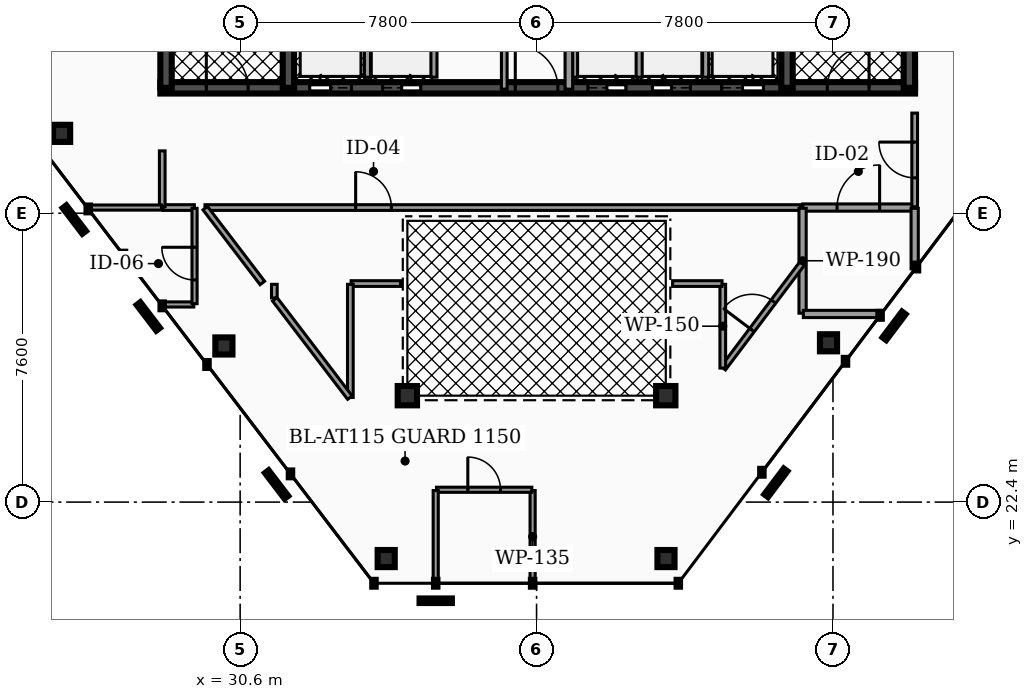
"""IFC4 building model, lengths in metres.
Left out: names, types, materials, properties, quantities, classifications, styles, units other than length and angle.
Written with IfcOpenShell. Run it as: python <this file> out.ifc"""

import sys

from ifc_helpers import new_model, si_unit, direction, frame, frame_2d, origin, origin_2d, place, context, subcontext, project, spatial, rectangle, hollow_rectangle, hollow_circle, extrude, element, fill, save


model = new_model("IFC4")
c1 = context("Model", 3, precision=1e-05, world=origin(), true_north=direction((0.0, 1.0)))
c2 = subcontext(c1, "Body", "Model", "MODEL_VIEW")
j1 = project(units=[si_unit("LENGTHUNIT", "METRE"), si_unit("PLANEANGLEUNIT", "RADIAN")], contexts=[c1])
p1 = place(None, origin())
s1 = spatial("IfcSite", under=j1, at=p1, CompositionType="ELEMENT")
p2 = place(p1, origin())
s2 = spatial("IfcBuilding", under=s1, at=p2, CompositionType="ELEMENT")
p3 = place(p2, frame((0.0, 0.0, 292.4)))
s3 = spatial("IfcBuildingStorey", under=s2, at=p3, CompositionType="ELEMENT", Elevation=292.4)
p4 = place(p3, frame((28.5, 33.3, 0.0), z_axis=(0.0, 0.0, 1.0), x_axis=(1.0, 0.0, 0.0)))
e1 = element("IfcWall", 1, at=p4, inside=s3, PredefinedType="SHEAR", context=c2, shape_type="SweptSolid", body=[
    extrude(rectangle(XDim=19.86, YDim=0.3, at=frame_2d((9.93, 0.0))), origin(), (0.0, 0.0, 1.0), 3.18),
])
p5 = place(p4, frame((3.93, 0.0, 0.0)))
e2 = element("IfcOpeningElement", 2, at=p5, cuts=e1, PredefinedType="OPENING", context=c2, shape_type="SweptSolid", body=[
    extrude(rectangle(XDim=1.1, YDim=2.15, at=frame_2d((0.55, 1.075))), frame((0.0, 0.16, 0.0), z_axis=(0.0, -1.0, 0.0), x_axis=(1.0, 0.0, 0.0)), (0.0, 0.0, 1.0), 0.32),
])
p6 = place(p4, frame((14.77, 0.0, 0.0)))
e3 = element("IfcOpeningElement", 3, at=p6, cuts=e1, PredefinedType="OPENING", context=c2, shape_type="SweptSolid", body=[
    extrude(rectangle(XDim=1.1, YDim=2.15, at=frame_2d((0.55, 1.075))), frame((0.0, 0.16, 0.0), z_axis=(0.0, -1.0, 0.0), x_axis=(1.0, 0.0, 0.0)), (0.0, 0.0, 1.0), 0.32),
])
p7 = place(p4, frame((11.25, 0.0, 0.0)))
e4 = element("IfcOpeningElement", 4, at=p7, cuts=e1, PredefinedType="OPENING", context=c2, shape_type="SweptSolid", body=[
    extrude(rectangle(XDim=1.0, YDim=2.1, at=frame_2d((0.5, 1.05))), frame((0.0, 0.16, 0.0), z_axis=(0.0, -1.0, 0.0), x_axis=(1.0, 0.0, 0.0)), (0.0, 0.0, 1.0), 0.32),
])
p8 = place(p4, frame((12.95, 0.0, 0.0)))
e5 = element("IfcOpeningElement", 5, at=p8, cuts=e1, PredefinedType="OPENING", context=c2, shape_type="SweptSolid", body=[
    extrude(rectangle(XDim=1.0, YDim=2.1, at=frame_2d((0.5, 1.05))), frame((0.0, 0.16, 0.0), z_axis=(0.0, -1.0, 0.0), x_axis=(1.0, 0.0, 0.0)), (0.0, 0.0, 1.0), 0.32),
])
p9 = place(p4, frame((5.85, 0.0, 0.0)))
e6 = element("IfcOpeningElement", 6, at=p9, cuts=e1, PredefinedType="OPENING", context=c2, shape_type="SweptSolid", body=[
    extrude(rectangle(XDim=1.0, YDim=2.1, at=frame_2d((0.5, 1.05))), frame((0.0, 0.16, 0.0), z_axis=(0.0, -1.0, 0.0), x_axis=(1.0, 0.0, 0.0)), (0.0, 0.0, 1.0), 0.32),
])
p10 = place(p4, frame((1.21, 0.0, 0.0)))
e7 = element("IfcOpeningElement", 7, at=p10, cuts=e1, PredefinedType="OPENING", context=c2, shape_type="SweptSolid", body=[
    extrude(rectangle(XDim=1.1, YDim=2.2, at=frame_2d((0.55, 1.1))), frame((0.0, 0.16, 0.0), z_axis=(0.0, -1.0, 0.0), x_axis=(1.0, 0.0, 0.0)), (0.0, 0.0, 1.0), 0.32),
])
p11 = place(p4, frame((9.34, 0.0, 0.0)))
e8 = element("IfcOpeningElement", 8, at=p11, cuts=e1, PredefinedType="OPENING", context=c2, shape_type="SweptSolid", body=[
    extrude(rectangle(XDim=1.12, YDim=2.05, at=frame_2d((0.56, 1.025))), frame((0.0, 0.16, 0.0), z_axis=(0.0, -1.0, 0.0), x_axis=(1.0, 0.0, 0.0)), (0.0, 0.0, 1.0), 0.32),
])
p12 = place(p4, frame((17.55, 0.0, 0.0)))
e9 = element("IfcOpeningElement", 9, at=p12, cuts=e1, PredefinedType="OPENING", context=c2, shape_type="SweptSolid", body=[
    extrude(rectangle(XDim=1.1, YDim=2.2, at=frame_2d((0.55, 1.1))), frame((0.0, 0.16, 0.0), z_axis=(0.0, -1.0, 0.0), x_axis=(1.0, 0.0, 0.0)), (0.0, 0.0, 1.0), 0.32),
])
for number, where, z_axis, x_axis in (
    (10, (28.65, 33.3, 0.0), (0.0, 0.0, 1.0), (0.0, 1.0, 0.0)),
    (11, (31.87, 33.3, 0.0), (0.0, 0.0, 1.0), (0.0, 1.0, 0.0)),
    (12, (44.99, 33.3, 0.0), (0.0, 0.0, 1.0), (0.0, 1.0, 0.0)),
    (13, (48.21, 33.3, 0.0), (0.0, 0.0, 1.0), (0.0, 1.0, 0.0)),
):
    element("IfcWall", number, at=place(p3, frame(where, z_axis=z_axis, x_axis=x_axis)), inside=s3, PredefinedType="SHEAR", context=c2, shape_type="SweptSolid", body=[
        extrude(rectangle(XDim=10.1, YDim=0.3, at=frame_2d((5.05, 0.0))), origin(), (0.0, 0.0, 1.0), 3.18),
    ])
for number, where, z_axis, x_axis in (
    (14, (25.902, 32.102, 0.0), (0.0, 0.0, 1.0), (1.0, 0.0, 0.0)),
    (15, (30.173, 26.508, 0.0), (0.0, 0.0, 1.0), (1.0, 0.0, 0.0)),
    (16, (34.443, 20.914, 0.0), (0.0, 0.0, 1.0), (1.0, 0.0, 0.0)),
    (17, (41.806, 20.914, 0.0), (0.0, 0.0, 1.0), (1.0, 0.0, 0.0)),
    (18, (46.082, 26.592, 0.0), (0.0, 0.0, 1.0), (1.0, 0.0, 0.0)),
):
    element("IfcColumn", number, at=place(p3, frame(where, z_axis=z_axis, x_axis=x_axis)), inside=s3, PredefinedType="COLUMN", context=c2, shape_type="SweptSolid", body=[
        extrude(hollow_rectangle(XDim=0.45, YDim=0.45, WallThickness=0.022, at=origin_2d()), origin(), (0.0, 0.0, 1.0), 3.18),
    ])
for number, where, z_axis, x_axis in (
    (19, (35.0, 25.2, 0.0), (0.0, 0.0, 1.0), (1.0, 0.0, 0.0)),
    (20, (41.8, 25.2, 0.0), (0.0, 0.0, 1.0), (1.0, 0.0, 0.0)),
):
    element("IfcColumn", number, at=place(p3, frame(where, z_axis=z_axis, x_axis=x_axis)), inside=s3, PredefinedType="COLUMN", context=c2, shape_type="SweptSolid", body=[
        extrude(hollow_circle(Radius=0.254, WallThickness=0.02, at=origin_2d()), origin(), (0.0, 0.0, 1.0), 3.18),
    ])
for number, where, z_axis, x_axis in (
    (21, (33.95, 33.58, 0.0), (0.0, 0.0, 1.0), (0.0, 1.0, 0.0)),
    (22, (42.85, 33.58, 0.0), (0.0, 0.0, 1.0), (0.0, 1.0, 0.0)),
):
    element("IfcWall", number, at=place(p3, frame(where, z_axis=z_axis, x_axis=x_axis)), inside=s3, PredefinedType="SOLIDWALL", context=c2, shape_type="SweptSolid", body=[
        extrude(rectangle(XDim=2.45, YDim=0.16, at=frame_2d((1.225, 0.0))), origin(), (0.0, 0.0, 1.0), 3.18),
    ])
for number, where, z_axis, x_axis in (
    (23, (39.4, 33.58, 0.0), (0.0, 0.0, 1.0), (0.0, 1.0, 0.0)),
    (24, (41.1, 33.58, 0.0), (0.0, 0.0, 1.0), (0.0, 1.0, 0.0)),
    (25, (35.7, 33.58, 0.0), (0.0, 0.0, 1.0), (0.0, 1.0, 0.0)),
):
    element("IfcWall", number, at=place(p3, frame(where, z_axis=z_axis, x_axis=x_axis)), inside=s3, PredefinedType="SOLIDWALL", context=c2, shape_type="SweptSolid", body=[
        extrude(rectangle(XDim=2.25, YDim=0.16, at=frame_2d((1.125, 0.0))), origin(), (0.0, 0.0, 1.0), 3.18),
    ])
p13 = place(p3, frame((37.55, 33.265, 0.0), z_axis=(0.0, 0.0, 1.0), x_axis=(0.0, 1.0, 0.0)))
e26 = element("IfcWall", 26, at=p13, inside=s3, PredefinedType="PARTITIONING", context=c2, shape_type="SweptSolid", body=[
    extrude(rectangle(XDim=3.615, YDim=0.15, at=frame_2d((1.808, 0.0))), origin(), (0.0, 0.0, 1.0), 2.235),
])
p14 = place(p13, frame((1.337, 0.0, 0.0)))
e27 = element("IfcOpeningElement", 27, at=p14, cuts=e26, PredefinedType="OPENING", context=c2, shape_type="SweptSolid", body=[
    extrude(rectangle(XDim=0.94, YDim=2.05, at=frame_2d((0.47, 1.025))), frame((0.0, 0.085, 0.0), z_axis=(0.0, -1.0, 0.0), x_axis=(1.0, 0.0, 0.0)), (0.0, 0.0, 1.0), 0.17),
])
p15 = place(p3, frame((39.25, 33.265, 0.0), z_axis=(0.0, 0.0, 1.0), x_axis=(0.0, 1.0, 0.0)))
e28 = element("IfcWall", 28, at=p15, inside=s3, PredefinedType="PARTITIONING", context=c2, shape_type="SweptSolid", body=[
    extrude(rectangle(XDim=3.615, YDim=0.2, at=frame_2d((1.808, 0.0))), origin(), (0.0, 0.0, 1.0), 2.235),
])
p16 = place(p3, frame((45.405, 30.15, 0.0), z_axis=(0.0, 0.0, 1.0), x_axis=(1.0, 0.0, 0.0)))
e29 = element("IfcWall", 29, at=p16, inside=s3, PredefinedType="PARTITIONING", context=c2, shape_type="SweptSolid", body=[
    extrude(rectangle(XDim=2.925, YDim=0.19, at=frame_2d((1.462, 0.0))), origin(), (0.0, 0.0, 1.0), 2.235),
])
p17 = place(p16, frame((0.903, 0.0, 0.0)))
e30 = element("IfcOpeningElement", 30, at=p17, cuts=e29, PredefinedType="OPENING", context=c2, shape_type="SweptSolid", body=[
    extrude(rectangle(XDim=1.12, YDim=2.05, at=frame_2d((0.56, 1.025))), frame((0.0, 0.105, 0.0), z_axis=(0.0, -1.0, 0.0), x_axis=(1.0, 0.0, 0.0)), (0.0, 0.0, 1.0), 0.21),
])
p18 = place(p3, frame((29.675, 30.15, 0.0), z_axis=(0.0, 0.0, 1.0), x_axis=(1.0, 0.0, 0.0)))
e31 = element("IfcWall", 31, at=p18, inside=s3, PredefinedType="PARTITIONING", context=c2, shape_type="SweptSolid", body=[
    extrude(rectangle(XDim=15.67, YDim=0.15, at=frame_2d((7.835, 0.0))), origin(), (0.0, 0.0, 1.0), 2.235),
])
p19 = place(p18, frame((3.965, 0.0, 0.0)))
e32 = element("IfcOpeningElement", 32, at=p19, cuts=e31, PredefinedType="OPENING", context=c2, shape_type="SweptSolid", body=[
    extrude(rectangle(XDim=0.94, YDim=2.05, at=frame_2d((0.47, 1.025))), frame((0.0, 0.085, 0.0), z_axis=(0.0, -1.0, 0.0), x_axis=(1.0, 0.0, 0.0)), (0.0, 0.0, 1.0), 0.17),
])
p20 = place(p3, frame((28.57, 30.15, 0.0), z_axis=(0.0, 0.0, 1.0), x_axis=(1.0, 0.0, 0.0)))
e33 = element("IfcWall", 33, at=p20, inside=s3, PredefinedType="PARTITIONING", context=c2, shape_type="SweptSolid", body=[
    extrude(rectangle(XDim=0.825, YDim=0.15, at=frame_2d((0.413, 0.0))), origin(), (0.0, 0.0, 1.0), 2.235),
])
p21 = place(p3, frame((28.55, 30.17, 0.0), z_axis=(0.0, 0.0, 1.0), x_axis=(0.0, 1.0, 0.0)))
e34 = element("IfcWall", 34, at=p21, inside=s3, PredefinedType="PARTITIONING", context=c2, shape_type="SweptSolid", body=[
    extrude(rectangle(XDim=1.471, YDim=0.15, at=frame_2d((0.736, 0.0))), origin(), (0.0, 0.0, 1.0), 2.235),
])
p22 = place(p3, frame((48.35, 30.17, 0.0), z_axis=(0.0, 0.0, 1.0), x_axis=(0.0, 1.0, 0.0)))
e35 = element("IfcWall", 35, at=p22, inside=s3, PredefinedType="PARTITIONING", context=c2, shape_type="SweptSolid", body=[
    extrude(rectangle(XDim=2.465, YDim=0.15, at=frame_2d((1.233, 0.0))), origin(), (0.0, 0.0, 1.0), 2.235),
])
p23 = place(p22, frame((0.763, 0.0, 0.0)))
e36 = element("IfcOpeningElement", 36, at=p23, cuts=e35, PredefinedType="OPENING", context=c2, shape_type="SweptSolid", body=[
    extrude(rectangle(XDim=0.94, YDim=2.05, at=frame_2d((0.47, 1.025))), frame((0.0, 0.085, 0.0), z_axis=(0.0, -1.0, 0.0), x_axis=(1.0, 0.0, 0.0)), (0.0, 0.0, 1.0), 0.17),
])
p24 = place(p3, frame((45.4, 27.37, 0.0), z_axis=(0.0, 0.0, 1.0), x_axis=(0.0, 1.0, 0.0)))
e37 = element("IfcWall", 37, at=p24, inside=s3, PredefinedType="PARTITIONING", context=c2, shape_type="SweptSolid", body=[
    extrude(rectangle(XDim=2.76, YDim=0.19, at=frame_2d((1.38, 0.0))), origin(), (0.0, 0.0, 1.0), 2.235),
])
p25 = place(p3, frame((45.42, 27.35, 0.0), z_axis=(0.0, 0.0, 1.0), x_axis=(1.0, 0.0, 0.0)))
e38 = element("IfcWall", 38, at=p25, inside=s3, PredefinedType="PARTITIONING", context=c2, shape_type="SweptSolid", body=[
    extrude(rectangle(XDim=2.032, YDim=0.19, at=frame_2d((1.016, 0.0))), origin(), (0.0, 0.0, 1.0), 2.235),
])
p26 = place(p3, frame((48.35, 28.537, 0.0), z_axis=(0.0, 0.0, 1.0), x_axis=(0.0, 1.0, 0.0)))
e39 = element("IfcWall", 39, at=p26, inside=s3, PredefinedType="PARTITIONING", context=c2, shape_type="SweptSolid", body=[
    extrude(rectangle(XDim=1.593, YDim=0.19, at=frame_2d((0.797, 0.0))), origin(), (0.0, 0.0, 1.0), 2.235),
])
p27 = place(p3, frame((43.312, 25.922, 0.0), z_axis=(0.0, 0.0, 1.0), x_axis=(0.60171699977, 0.798709366533, 0.0)))
e40 = element("IfcWall", 40, at=p27, inside=s3, PredefinedType="PARTITIONING", context=c2, shape_type="SweptSolid", body=[
    extrude(rectangle(XDim=3.455, YDim=0.15, at=frame_2d((1.728, 0.0))), origin(), (0.0, 0.0, 1.0), 2.235),
])
p28 = place(p27, frame((1.258, 0.0, 0.0)))
e41 = element("IfcOpeningElement", 41, at=p28, cuts=e40, PredefinedType="OPENING", context=c2, shape_type="SweptSolid", body=[
    extrude(rectangle(XDim=0.94, YDim=2.05, at=frame_2d((0.47, 1.025))), frame((0.0, 0.085, 0.0), z_axis=(0.0, -1.0, 0.0), x_axis=(1.0, 0.0, 0.0)), (0.0, 0.0, 1.0), 0.17),
])
p29 = place(p3, frame((43.3, 25.926, 0.0), z_axis=(0.0, 0.0, 1.0), x_axis=(0.0, 1.0, 0.0)))
e42 = element("IfcWall", 42, at=p29, inside=s3, PredefinedType="PARTITIONING", context=c2, shape_type="SweptSolid", body=[
    extrude(rectangle(XDim=2.204, YDim=0.15, at=frame_2d((1.102, 0.0))), origin(), (0.0, 0.0, 1.0), 2.235),
])
for number, where, z_axis, x_axis in (
    (43, (41.98, 28.15, 0.0), (0.0, 0.0, 1.0), (1.0, 0.0, 0.0)),
    (44, (33.52, 28.15, 0.0), (0.0, 0.0, 1.0), (1.0, 0.0, 0.0)),
):
    element("IfcWall", number, at=place(p3, frame(where, z_axis=z_axis, x_axis=x_axis)), inside=s3, PredefinedType="PARTITIONING", context=c2, shape_type="SweptSolid", body=[
        extrude(rectangle(XDim=1.3, YDim=0.15, at=frame_2d((0.65, 0.0))), origin(), (0.0, 0.0, 1.0), 2.235),
    ])
p30 = place(p3, frame((33.5, 25.153, 0.0), z_axis=(0.0, 0.0, 1.0), x_axis=(0.0, 1.0, 0.0)))
e45 = element("IfcWall", 45, at=p30, inside=s3, PredefinedType="PARTITIONING", context=c2, shape_type="SweptSolid", body=[
    extrude(rectangle(XDim=2.977, YDim=0.15, at=frame_2d((1.489, 0.0))), origin(), (0.0, 0.0, 1.0), 2.235),
])
p31 = place(p3, frame((31.512, 27.736, 0.0), z_axis=(0.0, 0.0, 1.0), x_axis=(0.606793028784, -0.794859874581, 0.0)))
e46 = element("IfcWall", 46, at=p31, inside=s3, PredefinedType="PARTITIONING", context=c2, shape_type="SweptSolid", body=[
    extrude(rectangle(XDim=3.256, YDim=0.15, at=frame_2d((1.628, 0.0))), origin(), (0.0, 0.0, 1.0), 2.235),
])
p32 = place(p3, frame((31.5, 27.772, 0.0), z_axis=(0.0, 0.0, 1.0), x_axis=(0.0, 1.0, 0.0)))
e47 = element("IfcWall", 47, at=p32, inside=s3, PredefinedType="PARTITIONING", context=c2, shape_type="SweptSolid", body=[
    extrude(rectangle(XDim=0.358, YDim=0.15, at=frame_2d((0.179, 0.0))), origin(), (0.0, 0.0, 1.0), 2.235),
])
p33 = place(p3, frame((29.682, 30.134, 0.0), z_axis=(0.0, 0.0, 1.0), x_axis=(0.60687170499, -0.794799807299, 0.0)))
e48 = element("IfcWall", 48, at=p33, inside=s3, PredefinedType="PARTITIONING", context=c2, shape_type="SweptSolid", body=[
    extrude(rectangle(XDim=2.476, YDim=0.15, at=frame_2d((1.238, 0.0))), origin(), (0.0, 0.0, 1.0), 2.235),
])
p34 = place(p3, frame((28.536, 27.6, 0.0), z_axis=(0.0, 0.0, 1.0), x_axis=(1.0, 0.0, 0.0)))
e49 = element("IfcWall", 49, at=p34, inside=s3, PredefinedType="PARTITIONING", context=c2, shape_type="SweptSolid", body=[
    extrude(rectangle(XDim=0.844, YDim=0.135, at=frame_2d((0.422, 0.0))), origin(), (0.0, 0.0, 1.0), 2.235),
])
p35 = place(p3, frame((29.4, 27.62, 0.0), z_axis=(0.0, 0.0, 1.0), x_axis=(0.0, 1.0, 0.0)))
e50 = element("IfcWall", 50, at=p35, inside=s3, PredefinedType="PARTITIONING", context=c2, shape_type="SweptSolid", body=[
    extrude(rectangle(XDim=2.51, YDim=0.135, at=frame_2d((1.255, 0.0))), origin(), (0.0, 0.0, 1.0), 2.235),
])
p36 = place(p35, frame((0.625, 0.0, 0.0)))
e51 = element("IfcOpeningElement", 51, at=p36, cuts=e50, PredefinedType="OPENING", context=c2, shape_type="SweptSolid", body=[
    extrude(rectangle(XDim=0.86, YDim=2.05, at=frame_2d((0.43, 1.025))), frame((0.0, 0.077, 0.0), z_axis=(0.0, -1.0, 0.0), x_axis=(1.0, 0.0, 0.0)), (0.0, 0.0, 1.0), 0.155),
])
p37 = place(p3, frame((38.296, 20.279, 0.0), z_axis=(0.0, 0.0, 1.0), x_axis=(0.0, 1.0, 0.0)))
e52 = element("IfcWall", 52, at=p37, inside=s3, PredefinedType="PARTITIONING", context=c2, shape_type="SweptSolid", body=[
    extrude(rectangle(XDim=2.425, YDim=0.135, at=frame_2d((1.212, 0.0))), origin(), (0.0, 0.0, 1.0), 2.235),
])
p38 = place(p3, frame((35.766, 22.724, 0.0), z_axis=(0.0, 0.0, 1.0), x_axis=(1.0, 0.0, 0.0)))
e53 = element("IfcWall", 53, at=p38, inside=s3, PredefinedType="PARTITIONING", context=c2, shape_type="SweptSolid", body=[
    extrude(rectangle(XDim=2.51, YDim=0.135, at=frame_2d((1.255, 0.0))), origin(), (0.0, 0.0, 1.0), 2.235),
])
p39 = place(p38, frame((0.825, 0.0, 0.0)))
e54 = element("IfcOpeningElement", 54, at=p39, cuts=e53, PredefinedType="OPENING", context=c2, shape_type="SweptSolid", body=[
    extrude(rectangle(XDim=0.86, YDim=2.05, at=frame_2d((0.43, 1.025))), frame((0.0, 0.077, 0.0), z_axis=(0.0, -1.0, 0.0), x_axis=(1.0, 0.0, 0.0)), (0.0, 0.0, 1.0), 0.155),
])
p40 = place(p3, frame((35.746, 20.279, 0.0), z_axis=(0.0, 0.0, 1.0), x_axis=(0.0, 1.0, 0.0)))
e55 = element("IfcWall", 55, at=p40, inside=s3, PredefinedType="PARTITIONING", context=c2, shape_type="SweptSolid", body=[
    extrude(rectangle(XDim=2.425, YDim=0.135, at=frame_2d((1.212, 0.0))), origin(), (0.0, 0.0, 1.0), 2.235),
])
p41 = place(p3, frame((26.59, 30.15, 0.0), z_axis=(0.0, 0.0, 1.0), x_axis=(1.0, 0.0, 0.0)))
e56 = element("IfcWall", 56, at=p41, inside=s3, PredefinedType="PARTITIONING", context=c2, shape_type="SweptSolid", body=[
    extrude(rectangle(XDim=1.94, YDim=0.135, at=frame_2d((0.97, 0.0))), origin(), (0.0, 0.0, 1.0), 2.235),
])
p42 = place(p5, origin())
e57 = element("IfcDoor", 57, at=p42, inside=s3, OperationType="SLIDING_TO_LEFT", PredefinedType="DOOR", context=c2, shape_type="SweptSolid", body=[
    extrude(rectangle(XDim=1.1, YDim=2.15, at=frame_2d((0.55, 1.075))), frame((0.0, 0.025, 0.0), z_axis=(0.0, -1.0, 0.0), x_axis=(1.0, 0.0, 0.0)), (0.0, 0.0, 1.0), 0.05),
])
fill(e2, e57)
p43 = place(p6, origin())
e58 = element("IfcDoor", 58, at=p43, inside=s3, OperationType="SLIDING_TO_RIGHT", PredefinedType="DOOR", context=c2, shape_type="SweptSolid", body=[
    extrude(rectangle(XDim=1.1, YDim=2.15, at=frame_2d((0.55, 1.075))), frame((0.0, 0.025, 0.0), z_axis=(0.0, -1.0, 0.0), x_axis=(1.0, 0.0, 0.0)), (0.0, 0.0, 1.0), 0.05),
])
fill(e3, e58)
p44 = place(p7, origin())
e59 = element("IfcDoor", 59, at=p44, inside=s3, OperationType="SLIDING_TO_RIGHT", PredefinedType="DOOR", context=c2, shape_type="SweptSolid", body=[
    extrude(rectangle(XDim=1.0, YDim=2.1, at=frame_2d((0.5, 1.05))), frame((0.0, 0.025, 0.0), z_axis=(0.0, -1.0, 0.0), x_axis=(1.0, 0.0, 0.0)), (0.0, 0.0, 1.0), 0.05),
])
fill(e4, e59)
p45 = place(p8, origin())
e60 = element("IfcDoor", 60, at=p45, inside=s3, OperationType="SLIDING_TO_LEFT", PredefinedType="DOOR", context=c2, shape_type="SweptSolid", body=[
    extrude(rectangle(XDim=1.0, YDim=2.1, at=frame_2d((0.5, 1.05))), frame((0.0, 0.025, 0.0), z_axis=(0.0, -1.0, 0.0), x_axis=(1.0, 0.0, 0.0)), (0.0, 0.0, 1.0), 0.05),
])
fill(e5, e60)
p46 = place(p9, origin())
e61 = element("IfcDoor", 61, at=p46, inside=s3, OperationType="SLIDING_TO_RIGHT", PredefinedType="DOOR", context=c2, shape_type="SweptSolid", body=[
    extrude(rectangle(XDim=1.0, YDim=2.1, at=frame_2d((0.5, 1.05))), frame((0.0, 0.025, 0.0), z_axis=(0.0, -1.0, 0.0), x_axis=(1.0, 0.0, 0.0)), (0.0, 0.0, 1.0), 0.05),
])
fill(e6, e61)
p47 = place(p10, origin())
e62 = element("IfcDoor", 62, at=p47, inside=s3, OperationType="SINGLE_SWING_LEFT", PredefinedType="DOOR", context=c2, shape_type="SweptSolid", body=[
    extrude(rectangle(XDim=1.1, YDim=2.2, at=frame_2d((0.55, 1.1))), frame((0.0, 0.025, 0.0), z_axis=(0.0, -1.0, 0.0), x_axis=(1.0, 0.0, 0.0)), (0.0, 0.0, 1.0), 0.05),
])
fill(e7, e62)
p48 = place(p11, origin())
e63 = element("IfcDoor", 63, at=p48, inside=s3, OperationType="SINGLE_SWING_LEFT", PredefinedType="DOOR", context=c2, shape_type="SweptSolid", body=[
    extrude(rectangle(XDim=1.12, YDim=2.05, at=frame_2d((0.56, 1.025))), frame((0.0, 0.025, 0.0), z_axis=(0.0, -1.0, 0.0), x_axis=(1.0, 0.0, 0.0)), (0.0, 0.0, 1.0), 0.05),
])
fill(e8, e63)
p49 = place(p12, origin())
e64 = element("IfcDoor", 64, at=p49, inside=s3, OperationType="SINGLE_SWING_RIGHT", PredefinedType="DOOR", context=c2, shape_type="SweptSolid", body=[
    extrude(rectangle(XDim=1.1, YDim=2.2, at=frame_2d((0.55, 1.1))), frame((0.0, 0.025, 0.0), z_axis=(0.0, -1.0, 0.0), x_axis=(1.0, 0.0, 0.0)), (0.0, 0.0, 1.0), 0.05),
])
fill(e9, e64)
p50 = place(p17, origin())
e65 = element("IfcDoor", 65, at=p50, inside=s3, OperationType="SINGLE_SWING_RIGHT", PredefinedType="DOOR", context=c2, shape_type="SweptSolid", body=[
    extrude(rectangle(XDim=1.12, YDim=2.05, at=frame_2d((0.56, 1.025))), frame((0.0, 0.025, 0.0), z_axis=(0.0, -1.0, 0.0), x_axis=(1.0, 0.0, 0.0)), (0.0, 0.0, 1.0), 0.05),
])
fill(e30, e65)
p51 = place(p19, origin())
e66 = element("IfcDoor", 66, at=p51, inside=s3, OperationType="SINGLE_SWING_LEFT", PredefinedType="DOOR", context=c2, shape_type="SweptSolid", body=[
    extrude(rectangle(XDim=0.94, YDim=2.05, at=frame_2d((0.47, 1.025))), frame((0.0, 0.025, 0.0), z_axis=(0.0, -1.0, 0.0), x_axis=(1.0, 0.0, 0.0)), (0.0, 0.0, 1.0), 0.05),
])
fill(e32, e66)
p52 = place(p23, origin())
e67 = element("IfcDoor", 67, at=p52, inside=s3, OperationType="SINGLE_SWING_RIGHT", PredefinedType="DOOR", context=c2, shape_type="SweptSolid", body=[
    extrude(rectangle(XDim=0.94, YDim=2.05, at=frame_2d((0.47, 1.025))), frame((0.0, 0.025, 0.0), z_axis=(0.0, -1.0, 0.0), x_axis=(1.0, 0.0, 0.0)), (0.0, 0.0, 1.0), 0.05),
])
fill(e36, e67)
p53 = place(p28, origin())
e68 = element("IfcDoor", 68, at=p53, inside=s3, OperationType="SINGLE_SWING_LEFT", PredefinedType="DOOR", context=c2, shape_type="SweptSolid", body=[
    extrude(rectangle(XDim=0.94, YDim=2.05, at=frame_2d((0.47, 1.025))), frame((0.0, 0.025, 0.0), z_axis=(0.0, -1.0, 0.0), x_axis=(1.0, 0.0, 0.0)), (0.0, 0.0, 1.0), 0.05),
])
fill(e41, e68)
p54 = place(p36, origin())
e69 = element("IfcDoor", 69, at=p54, inside=s3, OperationType="SINGLE_SWING_RIGHT", PredefinedType="DOOR", context=c2, shape_type="SweptSolid", body=[
    extrude(rectangle(XDim=0.86, YDim=2.05, at=frame_2d((0.43, 1.025))), frame((0.0, 0.025, 0.0), z_axis=(0.0, -1.0, 0.0), x_axis=(1.0, 0.0, 0.0)), (0.0, 0.0, 1.0), 0.05),
])
fill(e51, e69)
p55 = place(p39, origin())
e70 = element("IfcDoor", 70, at=p55, inside=s3, OperationType="SINGLE_SWING_LEFT", PredefinedType="DOOR", context=c2, shape_type="SweptSolid", body=[
    extrude(rectangle(XDim=0.86, YDim=2.05, at=frame_2d((0.43, 1.025))), frame((0.0, 0.025, 0.0), z_axis=(0.0, -1.0, 0.0), x_axis=(1.0, 0.0, 0.0)), (0.0, 0.0, 1.0), 0.05),
])
fill(e54, e70)
save(model, sys.argv[1])
